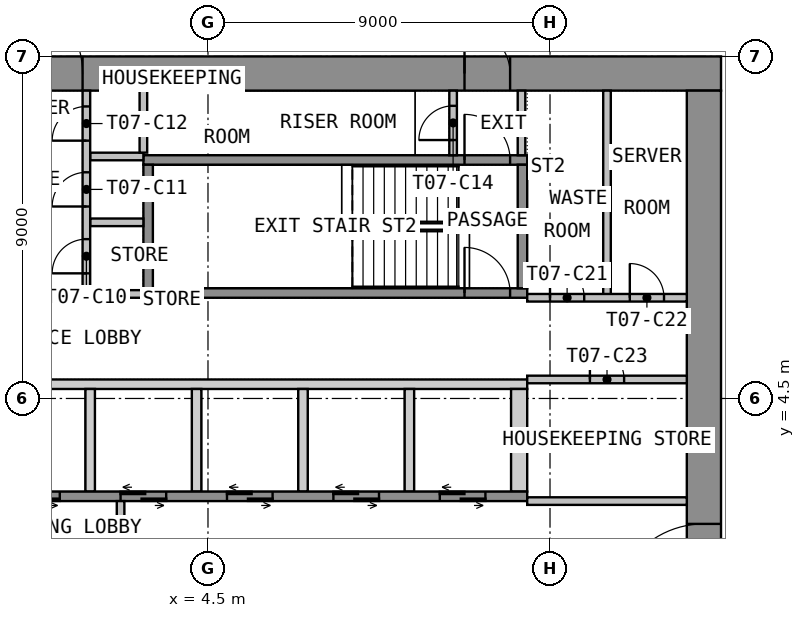
"""IFC4 building model, lengths in metres.
Left out: names, types, materials, properties, quantities, classifications, styles, units other than length and angle.
Written with IfcOpenShell. Run it as: python <this file> out.ifc"""

import sys

from ifc_helpers import new_model, si_unit, direction, frame, frame_2d, origin, place, context, subcontext, project, spatial, polyline, rectangle, outline, extrude, element, fill, save


model = new_model("IFC4")
c1 = context("Model", 3, precision=1e-05, world=origin(), true_north=direction((0.0, 1.0)))
c2 = subcontext(c1, "Body", "Model", "MODEL_VIEW")
j1 = project(units=[si_unit("LENGTHUNIT", "METRE"), si_unit("PLANEANGLEUNIT", "RADIAN")], contexts=[c1])
p1 = place(None, origin())
s1 = spatial("IfcSite", under=j1, at=p1, CompositionType="ELEMENT")
p2 = place(p1, origin())
s2 = spatial("IfcBuilding", under=s1, at=p2, CompositionType="ELEMENT")
p3 = place(p2, frame((0.0, 0.0, 104.7)))
s3 = spatial("IfcBuildingStorey", under=s2, at=p3, CompositionType="ELEMENT", Elevation=104.7)
p4 = place(p3, frame((-18.0, 13.05, 0.0), z_axis=(0.0, 0.0, 1.0), x_axis=(1.0, 0.0, 0.0)))
e1 = element("IfcWall", 1, at=p4, inside=s3, PredefinedType="SHEAR", context=c2, shape_type="SweptSolid", body=[
    extrude(rectangle(XDim=36.0, YDim=0.9, at=frame_2d((18.0, 0.0))), origin(), (0.0, 0.0, 1.0), 3.525),
])
p5 = place(p4, frame((16.8, 0.0, 0.0)))
e2 = element("IfcOpeningElement", 2, at=p5, cuts=e1, PredefinedType="OPENING", context=c2, shape_type="SweptSolid", body=[
    extrude(rectangle(XDim=2.4, YDim=2.1, at=frame_2d((1.2, 1.05))), frame((0.0, 0.46, 0.0), z_axis=(0.0, -1.0, 0.0), x_axis=(1.0, 0.0, 0.0)), (0.0, 0.0, 1.0), 0.92),
])
p6 = place(p4, frame((5.55, 0.0, 0.0)))
e3 = element("IfcOpeningElement", 3, at=p6, cuts=e1, PredefinedType="OPENING", context=c2, shape_type="SweptSolid", body=[
    extrude(rectangle(XDim=1.2, YDim=2.1, at=frame_2d((0.6, 1.05))), frame((0.0, 0.46, 0.0), z_axis=(0.0, -1.0, 0.0), x_axis=(1.0, 0.0, 0.0)), (0.0, 0.0, 1.0), 0.92),
])
p7 = place(p4, frame((29.25, 0.0, 0.0)))
e4 = element("IfcOpeningElement", 4, at=p7, cuts=e1, PredefinedType="OPENING", context=c2, shape_type="SweptSolid", body=[
    extrude(rectangle(XDim=1.2, YDim=2.1, at=frame_2d((0.6, 1.05))), frame((0.0, 0.46, 0.0), z_axis=(0.0, -1.0, 0.0), x_axis=(1.0, 0.0, 0.0)), (0.0, 0.0, 1.0), 0.92),
])
p8 = place(p3, frame((17.55, -12.6, 0.0), z_axis=(0.0, 0.0, 1.0), x_axis=(0.0, 1.0, 0.0)))
e5 = element("IfcWall", 5, at=p8, inside=s3, PredefinedType="SHEAR", context=c2, shape_type="SweptSolid", body=[
    extrude(rectangle(XDim=25.2, YDim=0.9, at=frame_2d((12.6, 0.0))), origin(), (0.0, 0.0, 1.0), 3.525),
])
p9 = place(p8, frame((11.4, 0.0, 0.0)))
e6 = element("IfcOpeningElement", 6, at=p9, cuts=e5, PredefinedType="OPENING", context=c2, shape_type="SweptSolid", body=[
    extrude(rectangle(XDim=2.4, YDim=2.1, at=frame_2d((1.2, 1.05))), frame((0.0, 0.46, 0.0), z_axis=(0.0, -1.0, 0.0), x_axis=(1.0, 0.0, 0.0)), (0.0, 0.0, 1.0), 0.92),
])
p10 = place(p3, origin())
e7 = element("IfcWall", 7, at=p10, inside=s3, PredefinedType="SHEAR", context=c2, shape_type="SweptSolid", body=[
    extrude(outline(polyline([(-12.9, 4.75), (12.9, 4.75), (12.9, 5.0), (-12.9, 5.0), (-12.9, 4.75)])), origin(), (0.0, 0.0, 1.0), 3.525),
])
p11 = place(p3, origin())
e8 = element("IfcWall", 8, at=p11, inside=s3, PredefinedType="SHEAR", context=c2, shape_type="SweptSolid", body=[
    extrude(outline(polyline([(1.275, 2.05), (1.525, 2.05), (1.525, 4.75), (1.275, 4.75), (1.275, 2.05)])), origin(), (0.0, 0.0, 1.0), 3.525),
])
p12 = place(p3, origin())
e9 = element("IfcWall", 9, at=p12, inside=s3, PredefinedType="SHEAR", context=c2, shape_type="SweptSolid", body=[
    extrude(outline(polyline([(4.075, 2.05), (4.325, 2.05), (4.325, 4.75), (4.075, 4.75), (4.075, 2.05)])), origin(), (0.0, 0.0, 1.0), 3.525),
])
p13 = place(p3, origin())
e10 = element("IfcWall", 10, at=p13, inside=s3, PredefinedType="SHEAR", context=c2, shape_type="SweptSolid", body=[
    extrude(outline(polyline([(6.875, 2.05), (7.125, 2.05), (7.125, 4.75), (6.875, 4.75), (6.875, 2.05)])), origin(), (0.0, 0.0, 1.0), 3.525),
])
p14 = place(p3, origin())
e11 = element("IfcWall", 11, at=p14, inside=s3, PredefinedType="SHEAR", context=c2, shape_type="SweptSolid", body=[
    extrude(outline(polyline([(9.675, 2.05), (9.925, 2.05), (9.925, 4.75), (9.675, 4.75), (9.675, 2.05)])), origin(), (0.0, 0.0, 1.0), 3.525),
])
p15 = place(p3, origin())
e12 = element("IfcWall", 12, at=p15, inside=s3, PredefinedType="SHEAR", context=c2, shape_type="SweptSolid", body=[
    extrude(outline(polyline([(12.475, 2.05), (12.9, 2.05), (12.9, 4.75), (12.475, 4.75), (12.475, 2.05)])), origin(), (0.0, 0.0, 1.0), 3.525),
])
p16 = place(p3, frame((-12.9, 1.925, 0.0), z_axis=(0.0, 0.0, 1.0), x_axis=(1.0, 0.0, 0.0)))
e13 = element("IfcWall", 13, at=p16, inside=s3, PredefinedType="SHEAR", context=c2, shape_type="SweptSolid", body=[
    extrude(rectangle(XDim=25.8, YDim=0.25, at=frame_2d((12.9, 0.0))), origin(), (0.0, 0.0, 1.0), 3.525),
])
p17 = place(p16, frame((9.5, 0.0, 0.0)))
e14 = element("IfcOpeningElement", 14, at=p17, cuts=e13, PredefinedType="OPENING", context=c2, shape_type="SweptSolid", body=[
    extrude(rectangle(XDim=1.2, YDim=2.1, at=frame_2d((0.6, 1.05))), frame((0.0, 0.135, 0.0), z_axis=(0.0, -1.0, 0.0), x_axis=(1.0, 0.0, 0.0)), (0.0, 0.0, 1.0), 0.27),
])
p18 = place(p16, frame((12.3, 0.0, 0.0)))
e15 = element("IfcOpeningElement", 15, at=p18, cuts=e13, PredefinedType="OPENING", context=c2, shape_type="SweptSolid", body=[
    extrude(rectangle(XDim=1.2, YDim=2.1, at=frame_2d((0.6, 1.05))), frame((0.0, 0.135, 0.0), z_axis=(0.0, -1.0, 0.0), x_axis=(1.0, 0.0, 0.0)), (0.0, 0.0, 1.0), 0.27),
])
p19 = place(p16, frame((15.1, 0.0, 0.0)))
e16 = element("IfcOpeningElement", 16, at=p19, cuts=e13, PredefinedType="OPENING", context=c2, shape_type="SweptSolid", body=[
    extrude(rectangle(XDim=1.2, YDim=2.1, at=frame_2d((0.6, 1.05))), frame((0.0, 0.135, 0.0), z_axis=(0.0, -1.0, 0.0), x_axis=(1.0, 0.0, 0.0)), (0.0, 0.0, 1.0), 0.27),
])
p20 = place(p16, frame((17.9, 0.0, 0.0)))
e17 = element("IfcOpeningElement", 17, at=p20, cuts=e13, PredefinedType="OPENING", context=c2, shape_type="SweptSolid", body=[
    extrude(rectangle(XDim=1.2, YDim=2.1, at=frame_2d((0.6, 1.05))), frame((0.0, 0.135, 0.0), z_axis=(0.0, -1.0, 0.0), x_axis=(1.0, 0.0, 0.0)), (0.0, 0.0, 1.0), 0.27),
])
p21 = place(p16, frame((20.7, 0.0, 0.0)))
e18 = element("IfcOpeningElement", 18, at=p21, cuts=e13, PredefinedType="OPENING", context=c2, shape_type="SweptSolid", body=[
    extrude(rectangle(XDim=1.2, YDim=2.1, at=frame_2d((0.6, 1.05))), frame((0.0, 0.135, 0.0), z_axis=(0.0, -1.0, 0.0), x_axis=(1.0, 0.0, 0.0)), (0.0, 0.0, 1.0), 0.27),
])
p22 = place(p16, frame((23.5, 0.0, 0.0)))
e19 = element("IfcOpeningElement", 19, at=p22, cuts=e13, PredefinedType="OPENING", context=c2, shape_type="SweptSolid", body=[
    extrude(rectangle(XDim=1.2, YDim=2.1, at=frame_2d((0.6, 1.05))), frame((0.0, 0.135, 0.0), z_axis=(0.0, -1.0, 0.0), x_axis=(1.0, 0.0, 0.0)), (0.0, 0.0, 1.0), 0.27),
])
p23 = place(p3, frame((2.2, -1.8, 0.0), z_axis=(0.0, 0.0, 1.0), x_axis=(0.0, 1.0, 0.0)))
e20 = element("IfcWall", 20, at=p23, inside=s3, PredefinedType="PARTITIONING", context=c2, shape_type="SweptSolid", body=[
    extrude(rectangle(XDim=3.6, YDim=0.2, at=frame_2d((1.8, 0.0))), origin(), (0.0, 0.0, 1.0), 3.525),
])
p24 = place(p23, frame((1.2, 0.0, 0.0)))
e21 = element("IfcOpeningElement", 21, at=p24, cuts=e20, PredefinedType="OPENING", context=c2, shape_type="SweptSolid", body=[
    extrude(rectangle(XDim=1.2, YDim=2.1, at=frame_2d((0.6, 1.05))), frame((0.0, 0.11, 0.0), z_axis=(0.0, -1.0, 0.0), x_axis=(1.0, 0.0, 0.0)), (0.0, 0.0, 1.0), 0.22),
])
p25 = place(p3, frame((2.8, 7.275, 0.0), z_axis=(0.0, 0.0, 1.0), x_axis=(1.0, 0.0, 0.0)))
e22 = element("IfcWall", 22, at=p25, inside=s3, PredefinedType="SHEAR", context=c2, shape_type="SweptSolid", body=[
    extrude(rectangle(XDim=10.1, YDim=0.25, at=frame_2d((5.05, 0.0))), origin(), (0.0, 0.0, 1.0), 3.525),
])
p26 = place(p25, frame((8.45, 0.0, 0.0)))
e23 = element("IfcOpeningElement", 23, at=p26, cuts=e22, PredefinedType="OPENING", context=c2, shape_type="SweptSolid", body=[
    extrude(rectangle(XDim=1.2, YDim=2.1, at=frame_2d((0.6, 1.05))), frame((0.0, 0.135, 0.0), z_axis=(0.0, -1.0, 0.0), x_axis=(1.0, 0.0, 0.0)), (0.0, 0.0, 1.0), 0.27),
])
p27 = place(p3, frame((2.8, 10.775, 0.0), z_axis=(0.0, 0.0, 1.0), x_axis=(1.0, 0.0, 0.0)))
e24 = element("IfcWall", 24, at=p27, inside=s3, PredefinedType="SHEAR", context=c2, shape_type="SweptSolid", body=[
    extrude(rectangle(XDim=10.1, YDim=0.25, at=frame_2d((5.05, 0.0))), origin(), (0.0, 0.0, 1.0), 3.525),
])
p28 = place(p27, frame((8.45, 0.0, 0.0)))
e25 = element("IfcOpeningElement", 25, at=p28, cuts=e24, PredefinedType="OPENING", context=c2, shape_type="SweptSolid", body=[
    extrude(rectangle(XDim=1.2, YDim=2.1, at=frame_2d((0.6, 1.05))), frame((0.0, 0.135, 0.0), z_axis=(0.0, -1.0, 0.0), x_axis=(1.0, 0.0, 0.0)), (0.0, 0.0, 1.0), 0.27),
])
for number, where, z_axis, x_axis in (
    (26, (2.925, 7.4, 0.0), (0.0, 0.0, 1.0), (0.0, 1.0, 0.0)),
    (27, (12.775, 7.4, 0.0), (0.0, 0.0, 1.0), (0.0, 1.0, 0.0)),
):
    element("IfcWall", number, at=place(p3, frame(where, z_axis=z_axis, x_axis=x_axis)), inside=s3, PredefinedType="SHEAR", context=c2, shape_type="SweptSolid", body=[
        extrude(rectangle(XDim=3.25, YDim=0.25, at=frame_2d((1.625, 0.0))), origin(), (0.0, 0.0, 1.0), 3.525),
    ])
for number, where, z_axis, x_axis in (
    (28, (1.4, 7.25, 0.0), (0.0, 0.0, 1.0), (1.0, 0.0, 0.0)),
    (29, (1.4, 9.135, 0.0), (0.0, 0.0, 1.0), (1.0, 0.0, 0.0)),
    (30, (1.4, 10.867, 0.0), (0.0, 0.0, 1.0), (1.0, 0.0, 0.0)),
):
    element("IfcWall", number, at=place(p3, frame(where, z_axis=z_axis, x_axis=x_axis)), inside=s3, PredefinedType="PARTITIONING", context=c2, shape_type="SweptSolid", body=[
        extrude(rectangle(XDim=1.4, YDim=0.2, at=frame_2d((0.7, 0.0))), origin(), (0.0, 0.0, 1.0), 3.525),
    ])
p29 = place(p3, frame((1.3, 7.15, 0.0), z_axis=(0.0, 0.0, 1.0), x_axis=(0.0, 1.0, 0.0)))
e31 = element("IfcWall", 31, at=p29, inside=s3, PredefinedType="PARTITIONING", context=c2, shape_type="SweptSolid", body=[
    extrude(rectangle(XDim=5.45, YDim=0.2, at=frame_2d((2.725, 0.0))), origin(), (0.0, 0.0, 1.0), 3.525),
])
p30 = place(p29, frame((0.643, 0.0, 0.0)))
e32 = element("IfcOpeningElement", 32, at=p30, cuts=e31, PredefinedType="OPENING", context=c2, shape_type="SweptSolid", body=[
    extrude(rectangle(XDim=0.9, YDim=2.1, at=frame_2d((0.45, 1.05))), frame((0.0, 0.11, 0.0), z_axis=(0.0, -1.0, 0.0), x_axis=(1.0, 0.0, 0.0)), (0.0, 0.0, 1.0), 0.22),
])
p31 = place(p29, frame((2.401, 0.0, 0.0)))
e33 = element("IfcOpeningElement", 33, at=p31, cuts=e31, PredefinedType="OPENING", context=c2, shape_type="SweptSolid", body=[
    extrude(rectangle(XDim=0.9, YDim=2.1, at=frame_2d((0.45, 1.05))), frame((0.0, 0.11, 0.0), z_axis=(0.0, -1.0, 0.0), x_axis=(1.0, 0.0, 0.0)), (0.0, 0.0, 1.0), 0.22),
])
p32 = place(p29, frame((4.134, 0.0, 0.0)))
e34 = element("IfcOpeningElement", 34, at=p32, cuts=e31, PredefinedType="OPENING", context=c2, shape_type="SweptSolid", body=[
    extrude(rectangle(XDim=0.9, YDim=2.1, at=frame_2d((0.45, 1.05))), frame((0.0, 0.11, 0.0), z_axis=(0.0, -1.0, 0.0), x_axis=(1.0, 0.0, 0.0)), (0.0, 0.0, 1.0), 0.22),
])
p33 = place(p3, frame((12.75, 10.9, 0.0), z_axis=(0.0, 0.0, 1.0), x_axis=(0.0, 1.0, 0.0)))
e35 = element("IfcWall", 35, at=p33, inside=s3, PredefinedType="PARTITIONING", context=c2, shape_type="SweptSolid", body=[
    extrude(rectangle(XDim=1.7, YDim=0.2, at=frame_2d((0.85, 0.0))), origin(), (0.0, 0.0, 1.0), 3.525),
])
p34 = place(p3, frame((10.95, 10.9, 0.0), z_axis=(0.0, 0.0, 1.0), x_axis=(0.0, 1.0, 0.0)))
e36 = element("IfcWall", 36, at=p34, inside=s3, PredefinedType="PARTITIONING", context=c2, shape_type="SweptSolid", body=[
    extrude(rectangle(XDim=1.7, YDim=0.2, at=frame_2d((0.85, 0.0))), origin(), (0.0, 0.0, 1.0), 3.525),
])
p35 = place(p34, frame((0.4, 0.0, 0.0)))
e37 = element("IfcOpeningElement", 37, at=p35, cuts=e36, PredefinedType="OPENING", context=c2, shape_type="SweptSolid", body=[
    extrude(rectangle(XDim=0.9, YDim=2.1, at=frame_2d((0.45, 1.05))), frame((0.0, 0.11, 0.0), z_axis=(0.0, -1.0, 0.0), x_axis=(1.0, 0.0, 0.0)), (0.0, 0.0, 1.0), 0.22),
])
p36 = place(p3, frame((15.0, 7.15, 0.0), z_axis=(0.0, 0.0, 1.0), x_axis=(0.0, 1.0, 0.0)))
e38 = element("IfcWall", 38, at=p36, inside=s3, PredefinedType="PARTITIONING", context=c2, shape_type="SweptSolid", body=[
    extrude(rectangle(XDim=5.45, YDim=0.2, at=frame_2d((2.725, 0.0))), origin(), (0.0, 0.0, 1.0), 3.525),
])
p37 = place(p3, frame((12.9, 7.15, 0.0), z_axis=(0.0, 0.0, 1.0), x_axis=(1.0, 0.0, 0.0)))
e39 = element("IfcWall", 39, at=p37, inside=s3, PredefinedType="PARTITIONING", context=c2, shape_type="SweptSolid", body=[
    extrude(rectangle(XDim=4.2, YDim=0.2, at=frame_2d((2.1, 0.0))), origin(), (0.0, 0.0, 1.0), 3.525),
])
p38 = place(p37, frame((0.6, 0.0, 0.0)))
e40 = element("IfcOpeningElement", 40, at=p38, cuts=e39, PredefinedType="OPENING", context=c2, shape_type="SweptSolid", body=[
    extrude(rectangle(XDim=0.9, YDim=2.1, at=frame_2d((0.45, 1.05))), frame((0.0, 0.11, 0.0), z_axis=(0.0, -1.0, 0.0), x_axis=(1.0, 0.0, 0.0)), (0.0, 0.0, 1.0), 0.22),
])
p39 = place(p37, frame((2.7, 0.0, 0.0)))
e41 = element("IfcOpeningElement", 41, at=p39, cuts=e39, PredefinedType="OPENING", context=c2, shape_type="SweptSolid", body=[
    extrude(rectangle(XDim=0.9, YDim=2.1, at=frame_2d((0.45, 1.05))), frame((0.0, 0.11, 0.0), z_axis=(0.0, -1.0, 0.0), x_axis=(1.0, 0.0, 0.0)), (0.0, 0.0, 1.0), 0.22),
])
p40 = place(p3, frame((12.9, 5.0, 0.0), z_axis=(0.0, 0.0, 1.0), x_axis=(1.0, 0.0, 0.0)))
e42 = element("IfcWall", 42, at=p40, inside=s3, PredefinedType="PARTITIONING", context=c2, shape_type="SweptSolid", body=[
    extrude(rectangle(XDim=4.2, YDim=0.2, at=frame_2d((2.1, 0.0))), origin(), (0.0, 0.0, 1.0), 3.525),
])
p41 = place(p40, frame((1.65, 0.0, 0.0)))
e43 = element("IfcOpeningElement", 43, at=p41, cuts=e42, PredefinedType="OPENING", context=c2, shape_type="SweptSolid", body=[
    extrude(rectangle(XDim=0.9, YDim=2.1, at=frame_2d((0.45, 1.05))), frame((0.0, 0.11, 0.0), z_axis=(0.0, -1.0, 0.0), x_axis=(1.0, 0.0, 0.0)), (0.0, 0.0, 1.0), 0.22),
])
p42 = place(p3, frame((12.9, 1.8, 0.0), z_axis=(0.0, 0.0, 1.0), x_axis=(1.0, 0.0, 0.0)))
e44 = element("IfcWall", 44, at=p42, inside=s3, PredefinedType="PARTITIONING", context=c2, shape_type="SweptSolid", body=[
    extrude(rectangle(XDim=4.2, YDim=0.2, at=frame_2d((2.1, 0.0))), origin(), (0.0, 0.0, 1.0), 3.525),
])
p43 = place(p3, frame((2.8, 12.599, 0.0), z_axis=(0.0, 0.0, 1.0), x_axis=(0.0, -1.0, 0.0)))
e45 = element("IfcWall", 45, at=p43, inside=s3, PredefinedType="PARTITIONING", context=c2, shape_type="SweptSolid", body=[
    extrude(rectangle(XDim=1.631, YDim=0.2, at=frame_2d((0.815, 0.0))), origin(), (0.0, 0.0, 1.0), 3.525),
])
p44 = place(p9, origin())
e46 = element("IfcDoor", 46, at=p44, inside=s3, OperationType="DOUBLE_DOOR_DOUBLE_SWING", PredefinedType="DOOR", context=c2, shape_type="SweptSolid", body=[
    extrude(rectangle(XDim=2.4, YDim=2.1, at=frame_2d((1.2, 1.05))), frame((0.0, 0.025, 0.0), z_axis=(0.0, -1.0, 0.0), x_axis=(1.0, 0.0, 0.0)), (0.0, 0.0, 1.0), 0.05),
])
fill(e6, e46)
p45 = place(p5, origin())
e47 = element("IfcDoor", 47, at=p45, inside=s3, OperationType="DOUBLE_DOOR_DOUBLE_SWING", PredefinedType="DOOR", context=c2, shape_type="SweptSolid", body=[
    extrude(rectangle(XDim=2.4, YDim=2.1, at=frame_2d((1.2, 1.05))), frame((0.0, 0.025, 0.0), z_axis=(0.0, -1.0, 0.0), x_axis=(1.0, 0.0, 0.0)), (0.0, 0.0, 1.0), 0.05),
])
fill(e2, e47)
p46 = place(p7, origin())
e48 = element("IfcDoor", 48, at=p46, inside=s3, OperationType="SINGLE_SWING_RIGHT", PredefinedType="DOOR", context=c2, shape_type="SweptSolid", body=[
    extrude(rectangle(XDim=1.2, YDim=2.1, at=frame_2d((0.6, 1.05))), frame((0.0, 0.025, 0.0), z_axis=(0.0, -1.0, 0.0), x_axis=(1.0, 0.0, 0.0)), (0.0, 0.0, 1.0), 0.05),
])
fill(e4, e48)
p47 = place(p18, origin())
e49 = element("IfcDoor", 49, at=p47, inside=s3, OperationType="DOUBLE_DOOR_SLIDING", PredefinedType="DOOR", context=c2, shape_type="SweptSolid", body=[
    extrude(rectangle(XDim=1.2, YDim=2.1, at=frame_2d((0.6, 1.05))), frame((0.0, 0.025, 0.0), z_axis=(0.0, -1.0, 0.0), x_axis=(1.0, 0.0, 0.0)), (0.0, 0.0, 1.0), 0.05),
])
fill(e15, e49)
p48 = place(p19, origin())
e50 = element("IfcDoor", 50, at=p48, inside=s3, OperationType="DOUBLE_DOOR_SLIDING", PredefinedType="DOOR", context=c2, shape_type="SweptSolid", body=[
    extrude(rectangle(XDim=1.2, YDim=2.1, at=frame_2d((0.6, 1.05))), frame((0.0, 0.025, 0.0), z_axis=(0.0, -1.0, 0.0), x_axis=(1.0, 0.0, 0.0)), (0.0, 0.0, 1.0), 0.05),
])
fill(e16, e50)
p49 = place(p20, origin())
e51 = element("IfcDoor", 51, at=p49, inside=s3, OperationType="DOUBLE_DOOR_SLIDING", PredefinedType="DOOR", context=c2, shape_type="SweptSolid", body=[
    extrude(rectangle(XDim=1.2, YDim=2.1, at=frame_2d((0.6, 1.05))), frame((0.0, 0.025, 0.0), z_axis=(0.0, -1.0, 0.0), x_axis=(1.0, 0.0, 0.0)), (0.0, 0.0, 1.0), 0.05),
])
fill(e17, e51)
p50 = place(p21, origin())
e52 = element("IfcDoor", 52, at=p50, inside=s3, OperationType="DOUBLE_DOOR_SLIDING", PredefinedType="DOOR", context=c2, shape_type="SweptSolid", body=[
    extrude(rectangle(XDim=1.2, YDim=2.1, at=frame_2d((0.6, 1.05))), frame((0.0, 0.025, 0.0), z_axis=(0.0, -1.0, 0.0), x_axis=(1.0, 0.0, 0.0)), (0.0, 0.0, 1.0), 0.05),
])
fill(e18, e52)
p51 = place(p22, origin())
e53 = element("IfcDoor", 53, at=p51, inside=s3, OperationType="DOUBLE_DOOR_SLIDING", PredefinedType="DOOR", context=c2, shape_type="SweptSolid", body=[
    extrude(rectangle(XDim=1.2, YDim=2.1, at=frame_2d((0.6, 1.05))), frame((0.0, 0.025, 0.0), z_axis=(0.0, -1.0, 0.0), x_axis=(1.0, 0.0, 0.0)), (0.0, 0.0, 1.0), 0.05),
])
fill(e19, e53)
p52 = place(p26, origin())
e54 = element("IfcDoor", 54, at=p52, inside=s3, OperationType="SINGLE_SWING_LEFT", PredefinedType="DOOR", context=c2, shape_type="SweptSolid", body=[
    extrude(rectangle(XDim=1.2, YDim=2.1, at=frame_2d((0.6, 1.05))), frame((0.0, 0.025, 0.0), z_axis=(0.0, -1.0, 0.0), x_axis=(1.0, 0.0, 0.0)), (0.0, 0.0, 1.0), 0.05),
])
fill(e23, e54)
p53 = place(p30, origin())
e55 = element("IfcDoor", 55, at=p53, inside=s3, OperationType="SINGLE_SWING_LEFT", PredefinedType="DOOR", context=c2, shape_type="SweptSolid", body=[
    extrude(rectangle(XDim=0.9, YDim=2.1, at=frame_2d((0.45, 1.05))), frame((0.0, 0.025, 0.0), z_axis=(0.0, -1.0, 0.0), x_axis=(1.0, 0.0, 0.0)), (0.0, 0.0, 1.0), 0.05),
])
fill(e32, e55)
p54 = place(p31, origin())
e56 = element("IfcDoor", 56, at=p54, inside=s3, OperationType="SINGLE_SWING_LEFT", PredefinedType="DOOR", context=c2, shape_type="SweptSolid", body=[
    extrude(rectangle(XDim=0.9, YDim=2.1, at=frame_2d((0.45, 1.05))), frame((0.0, 0.025, 0.0), z_axis=(0.0, -1.0, 0.0), x_axis=(1.0, 0.0, 0.0)), (0.0, 0.0, 1.0), 0.05),
])
fill(e33, e56)
p55 = place(p32, origin())
e57 = element("IfcDoor", 57, at=p55, inside=s3, OperationType="SINGLE_SWING_LEFT", PredefinedType="DOOR", context=c2, shape_type="SweptSolid", body=[
    extrude(rectangle(XDim=0.9, YDim=2.1, at=frame_2d((0.45, 1.05))), frame((0.0, 0.025, 0.0), z_axis=(0.0, -1.0, 0.0), x_axis=(1.0, 0.0, 0.0)), (0.0, 0.0, 1.0), 0.05),
])
fill(e34, e57)
p56 = place(p28, origin())
e58 = element("IfcDoor", 58, at=p56, inside=s3, OperationType="SINGLE_SWING_RIGHT", PredefinedType="DOOR", context=c2, shape_type="SweptSolid", body=[
    extrude(rectangle(XDim=1.2, YDim=2.1, at=frame_2d((0.6, 1.05))), frame((0.0, 0.025, 0.0), z_axis=(0.0, -1.0, 0.0), x_axis=(1.0, 0.0, 0.0)), (0.0, 0.0, 1.0), 0.05),
])
fill(e25, e58)
p57 = place(p35, origin())
e59 = element("IfcDoor", 59, at=p57, inside=s3, OperationType="SINGLE_SWING_LEFT", PredefinedType="DOOR", context=c2, shape_type="SweptSolid", body=[
    extrude(rectangle(XDim=0.9, YDim=2.1, at=frame_2d((0.45, 1.05))), frame((0.0, 0.025, 0.0), z_axis=(0.0, -1.0, 0.0), x_axis=(1.0, 0.0, 0.0)), (0.0, 0.0, 1.0), 0.05),
])
fill(e37, e59)
p58 = place(p38, origin())
e60 = element("IfcDoor", 60, at=p58, inside=s3, OperationType="SINGLE_SWING_LEFT", PredefinedType="DOOR", context=c2, shape_type="SweptSolid", body=[
    extrude(rectangle(XDim=0.9, YDim=2.1, at=frame_2d((0.45, 1.05))), frame((0.0, 0.025, 0.0), z_axis=(0.0, -1.0, 0.0), x_axis=(1.0, 0.0, 0.0)), (0.0, 0.0, 1.0), 0.05),
])
fill(e40, e60)
p59 = place(p39, origin())
e61 = element("IfcDoor", 61, at=p59, inside=s3, OperationType="SINGLE_SWING_LEFT", PredefinedType="DOOR", context=c2, shape_type="SweptSolid", body=[
    extrude(rectangle(XDim=0.9, YDim=2.1, at=frame_2d((0.45, 1.05))), frame((0.0, 0.025, 0.0), z_axis=(0.0, -1.0, 0.0), x_axis=(1.0, 0.0, 0.0)), (0.0, 0.0, 1.0), 0.05),
])
fill(e41, e61)
p60 = place(p41, origin())
e62 = element("IfcDoor", 62, at=p60, inside=s3, OperationType="SINGLE_SWING_LEFT", PredefinedType="DOOR", context=c2, shape_type="SweptSolid", body=[
    extrude(rectangle(XDim=0.9, YDim=2.1, at=frame_2d((0.45, 1.05))), frame((0.0, 0.025, 0.0), z_axis=(0.0, -1.0, 0.0), x_axis=(1.0, 0.0, 0.0)), (0.0, 0.0, 1.0), 0.05),
])
fill(e43, e62)
save(model, sys.argv[1])
